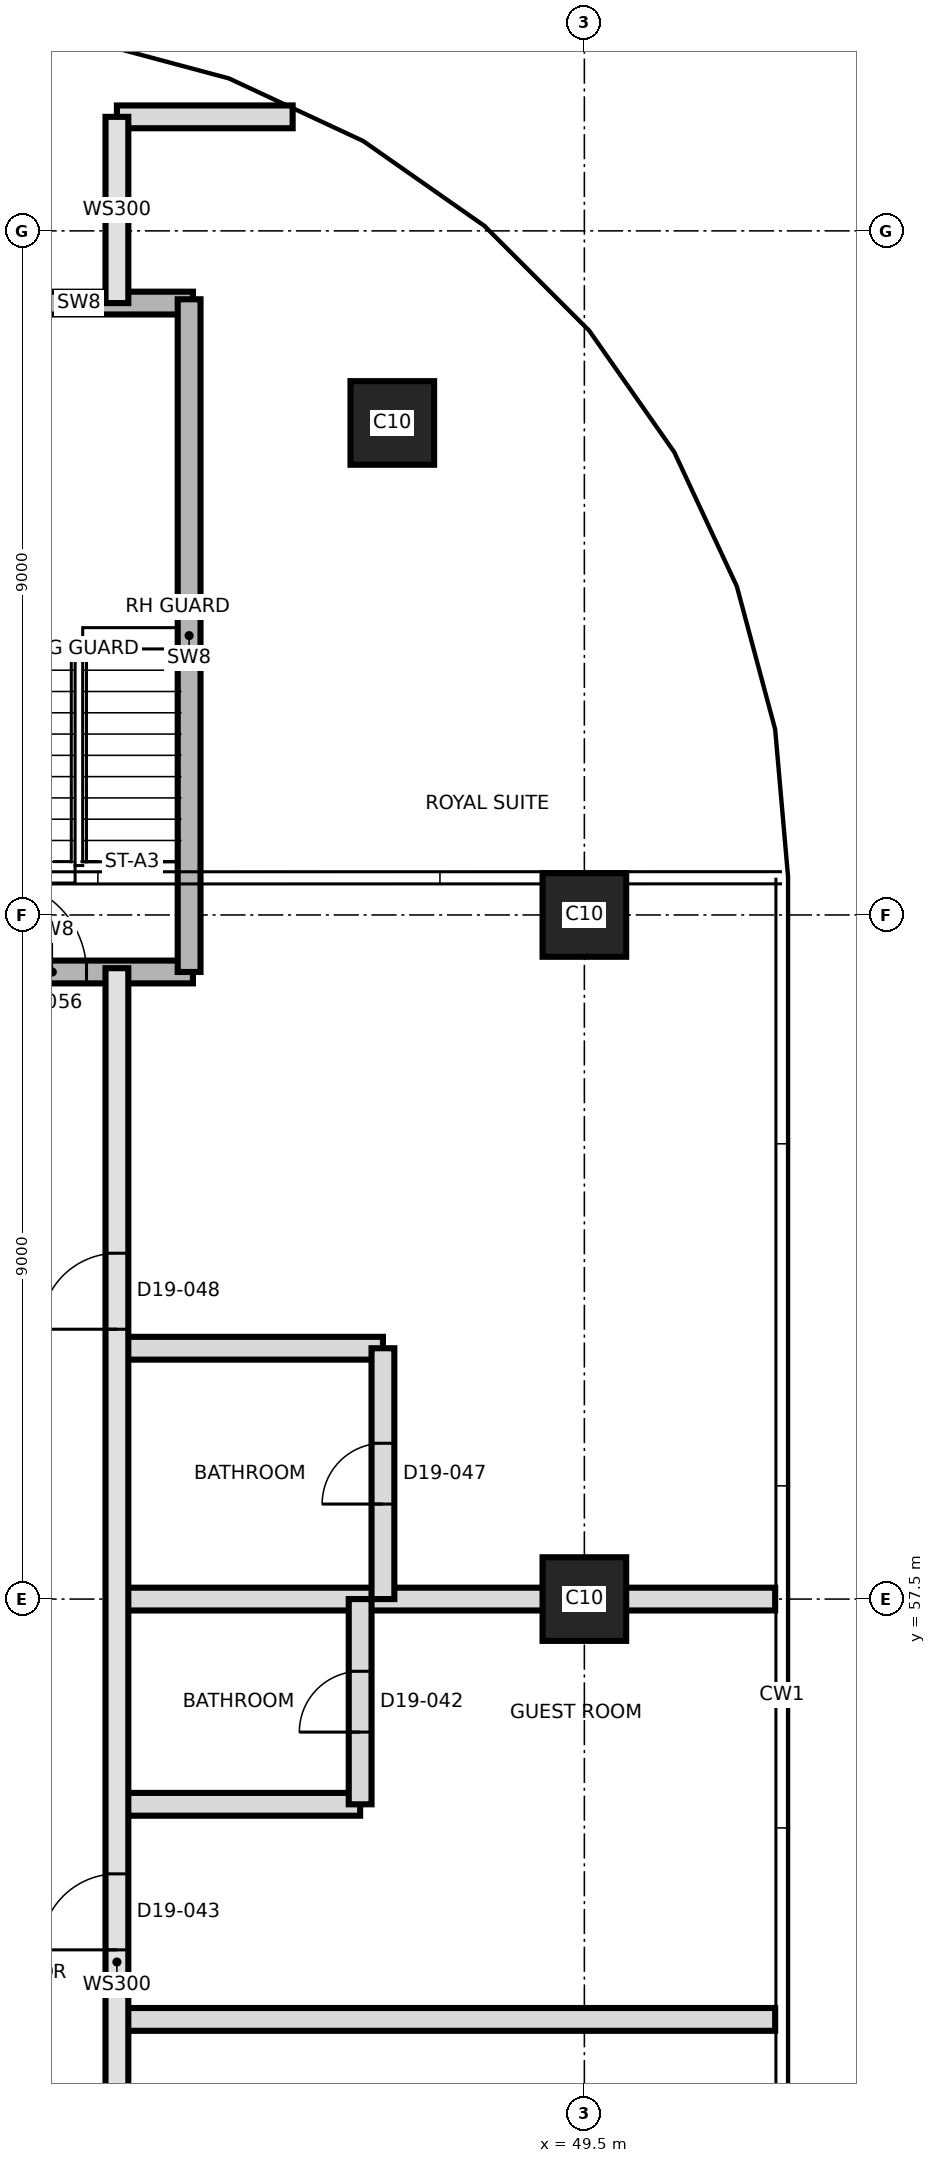
"""IFC4 building model, lengths in metres.
Left out: names, types, materials, properties, quantities, classifications, styles, units other than length and angle.
Written with IfcOpenShell. Run it as: python <this file> out.ifc"""

import sys

from ifc_helpers import new_model, si_unit, direction, frame, frame_2d, origin, origin_2d, place, context, subcontext, project, spatial, rectangle, extrude, element, fill, save


model = new_model("IFC4")
c1 = context("Model", 3, precision=1e-05, world=origin(), true_north=direction((0.0, 1.0)))
c2 = subcontext(c1, "Body", "Model", "MODEL_VIEW")
j1 = project(units=[si_unit("LENGTHUNIT", "METRE"), si_unit("PLANEANGLEUNIT", "RADIAN")], contexts=[c1])
p1 = place(None, origin())
s1 = spatial("IfcSite", under=j1, at=p1, CompositionType="ELEMENT")
p2 = place(p1, origin())
s2 = spatial("IfcBuilding", under=s1, at=p2, CompositionType="ELEMENT")
p3 = place(p2, frame((0.0, 0.0, 179.2)))
s3 = spatial("IfcBuildingStorey", under=s2, at=p3, CompositionType="ELEMENT", Elevation=179.2)
for number, where, z_axis, x_axis in (
    (1, (49.5, 57.5, 0.0), (0.0, 0.0, 1.0), (1.0, 0.0, 0.0)),
    (2, (49.5, 66.5, 0.0), (0.0, 0.0, 1.0), (1.0, 0.0, 0.0)),
    (3, (46.973, 72.973, 0.0), (0.0, 0.0, 1.0), (1.0, 0.0, 0.0)),
):
    element("IfcColumn", number, at=place(p3, frame(where, z_axis=z_axis, x_axis=x_axis)), inside=s3, PredefinedType="COLUMN", context=c2, shape_type="SweptSolid", body=[
        extrude(rectangle(XDim=1.1, YDim=1.1, at=origin_2d()), origin(), (0.0, 0.0, 1.0), 3.7),
    ])
p4 = place(p3, frame((43.35, 51.97, 0.0), z_axis=(0.0, 0.0, 1.0), x_axis=(1.0, 0.0, 0.0)))
e4 = element("IfcWall", 4, at=p4, inside=s3, PredefinedType="PARTITIONING", context=c2, shape_type="SweptSolid", body=[
    extrude(rectangle(XDim=8.66, YDim=0.3, at=frame_2d((4.33, 0.0))), origin(), (0.0, 0.0, 1.0), 3.4),
])
p5 = place(p3, frame((43.35, 54.8, 0.0), z_axis=(0.0, 0.0, 1.0), x_axis=(1.0, 0.0, 0.0)))
e5 = element("IfcWall", 5, at=p5, inside=s3, PredefinedType="PARTITIONING", context=c2, shape_type="SweptSolid", body=[
    extrude(rectangle(XDim=3.2, YDim=0.3, at=frame_2d((1.6, 0.0))), origin(), (0.0, 0.0, 1.0), 3.4),
])
p6 = place(p3, frame((43.35, 57.5, 0.0), z_axis=(0.0, 0.0, 1.0), x_axis=(1.0, 0.0, 0.0)))
e6 = element("IfcWall", 6, at=p6, inside=s3, PredefinedType="PARTITIONING", context=c2, shape_type="SweptSolid", body=[
    extrude(rectangle(XDim=8.66, YDim=0.3, at=frame_2d((4.33, 0.0))), origin(), (0.0, 0.0, 1.0), 3.4),
])
p7 = place(p3, frame((43.35, 60.8, 0.0), z_axis=(0.0, 0.0, 1.0), x_axis=(1.0, 0.0, 0.0)))
e7 = element("IfcWall", 7, at=p7, inside=s3, PredefinedType="PARTITIONING", context=c2, shape_type="SweptSolid", body=[
    extrude(rectangle(XDim=3.5, YDim=0.3, at=frame_2d((1.75, 0.0))), origin(), (0.0, 0.0, 1.0), 3.4),
])
p8 = place(p3, frame((40.65, 65.75, 0.0), z_axis=(0.0, 0.0, 1.0), x_axis=(1.0, 0.0, 0.0)))
e8 = element("IfcWall", 8, at=p8, inside=s3, PredefinedType="SHEAR", context=c2, shape_type="SweptSolid", body=[
    extrude(rectangle(XDim=3.7, YDim=0.3, at=frame_2d((1.85, 0.0))), origin(), (0.0, 0.0, 1.0), 3.4),
])
p9 = place(p8, frame((1.1, 0.0, 0.0)))
e9 = element("IfcOpeningElement", 9, at=p9, cuts=e8, PredefinedType="OPENING", context=c2, shape_type="SweptSolid", body=[
    extrude(rectangle(XDim=1.2, YDim=2.1, at=frame_2d((0.6, 1.05))), frame((0.0, 0.16, 0.0), z_axis=(0.0, -1.0, 0.0), x_axis=(1.0, 0.0, 0.0)), (0.0, 0.0, 1.0), 0.32),
])
p10 = place(p3, frame((41.35, 74.55, 0.0), z_axis=(0.0, 0.0, 1.0), x_axis=(1.0, 0.0, 0.0)))
e10 = element("IfcWall", 10, at=p10, inside=s3, PredefinedType="SHEAR", context=c2, shape_type="SweptSolid", body=[
    extrude(rectangle(XDim=3.0, YDim=0.3, at=frame_2d((1.5, 0.0))), origin(), (0.0, 0.0, 1.0), 3.4),
])
p11 = place(p3, frame((43.35, 77.0, 0.0), z_axis=(0.0, 0.0, 1.0), x_axis=(1.0, 0.0, 0.0)))
e11 = element("IfcWall", 11, at=p11, inside=s3, PredefinedType="PARTITIONING", context=c2, shape_type="SweptSolid", body=[
    extrude(rectangle(XDim=2.312, YDim=0.3, at=frame_2d((1.156, 0.0))), origin(), (0.0, 0.0, 1.0), 3.4),
])
p12 = place(p3, frame((43.35, 39.65, 0.0), z_axis=(0.0, 0.0, 1.0), x_axis=(0.0, 1.0, 0.0)))
e12 = element("IfcWall", 12, at=p12, inside=s3, PredefinedType="SOLIDWALL", context=c2, shape_type="SweptSolid", body=[
    extrude(rectangle(XDim=26.15, YDim=0.3, at=frame_2d((13.075, 0.0))), origin(), (0.0, 0.0, 1.0), 3.4),
])
p13 = place(p12, frame((3.265, 0.0, 0.0)))
e13 = element("IfcOpeningElement", 13, at=p13, cuts=e12, PredefinedType="OPENING", context=c2, shape_type="SweptSolid", body=[
    extrude(rectangle(XDim=1.0, YDim=2.1, at=frame_2d((0.5, 1.05))), frame((0.0, 0.16, 0.0), z_axis=(0.0, -1.0, 0.0), x_axis=(1.0, 0.0, 0.0)), (0.0, 0.0, 1.0), 0.32),
])
p14 = place(p12, frame((6.215, 0.0, 0.0)))
e14 = element("IfcOpeningElement", 14, at=p14, cuts=e12, PredefinedType="OPENING", context=c2, shape_type="SweptSolid", body=[
    extrude(rectangle(XDim=1.4, YDim=2.1, at=frame_2d((0.7, 1.05))), frame((0.0, 0.16, 0.0), z_axis=(0.0, -1.0, 0.0), x_axis=(1.0, 0.0, 0.0)), (0.0, 0.0, 1.0), 0.32),
])
p15 = place(p12, frame((9.985, 0.0, 0.0)))
e15 = element("IfcOpeningElement", 15, at=p15, cuts=e12, PredefinedType="OPENING", context=c2, shape_type="SweptSolid", body=[
    extrude(rectangle(XDim=1.2, YDim=2.1, at=frame_2d((0.6, 1.05))), frame((0.0, 0.16, 0.0), z_axis=(0.0, -1.0, 0.0), x_axis=(1.0, 0.0, 0.0)), (0.0, 0.0, 1.0), 0.32),
])
p16 = place(p12, frame((13.235, 0.0, 0.0)))
e16 = element("IfcOpeningElement", 16, at=p16, cuts=e12, PredefinedType="OPENING", context=c2, shape_type="SweptSolid", body=[
    extrude(rectangle(XDim=1.0, YDim=2.1, at=frame_2d((0.5, 1.05))), frame((0.0, 0.16, 0.0), z_axis=(0.0, -1.0, 0.0), x_axis=(1.0, 0.0, 0.0)), (0.0, 0.0, 1.0), 0.32),
])
p17 = place(p12, frame((21.4, 0.0, 0.0)))
e17 = element("IfcOpeningElement", 17, at=p17, cuts=e12, PredefinedType="OPENING", context=c2, shape_type="SweptSolid", body=[
    extrude(rectangle(XDim=1.0, YDim=2.4, at=frame_2d((0.5, 1.2))), frame((0.0, 0.16, 0.0), z_axis=(0.0, -1.0, 0.0), x_axis=(1.0, 0.0, 0.0)), (0.0, 0.0, 1.0), 0.32),
])
p18 = place(p3, frame((43.35, 74.55, 0.0), z_axis=(0.0, 0.0, 1.0), x_axis=(0.0, 1.0, 0.0)))
e18 = element("IfcWall", 18, at=p18, inside=s3, PredefinedType="SOLIDWALL", context=c2, shape_type="SweptSolid", body=[
    extrude(rectangle(XDim=2.45, YDim=0.3, at=frame_2d((1.225, 0.0))), origin(), (0.0, 0.0, 1.0), 3.4),
])
p19 = place(p3, frame((44.3, 65.75, 0.0), z_axis=(0.0, 0.0, 1.0), x_axis=(0.0, 1.0, 0.0)))
e19 = element("IfcWall", 19, at=p19, inside=s3, PredefinedType="SHEAR", context=c2, shape_type="SweptSolid", body=[
    extrude(rectangle(XDim=8.85, YDim=0.3, at=frame_2d((4.425, 0.0))), origin(), (0.0, 0.0, 1.0), 3.4),
])
p20 = place(p3, frame((46.55, 54.8, 0.0), z_axis=(0.0, 0.0, 1.0), x_axis=(0.0, 1.0, 0.0)))
e20 = element("IfcWall", 20, at=p20, inside=s3, PredefinedType="PARTITIONING", context=c2, shape_type="SweptSolid", body=[
    extrude(rectangle(XDim=2.7, YDim=0.3, at=frame_2d((1.35, 0.0))), origin(), (0.0, 0.0, 1.0), 3.4),
])
p21 = place(p20, frame((0.95, 0.0, 0.0)))
e21 = element("IfcOpeningElement", 21, at=p21, cuts=e20, PredefinedType="OPENING", context=c2, shape_type="SweptSolid", body=[
    extrude(rectangle(XDim=0.8, YDim=2.1, at=frame_2d((0.4, 1.05))), frame((0.0, 0.16, 0.0), z_axis=(0.0, -1.0, 0.0), x_axis=(1.0, 0.0, 0.0)), (0.0, 0.0, 1.0), 0.32),
])
p22 = place(p3, frame((46.85, 57.5, 0.0), z_axis=(0.0, 0.0, 1.0), x_axis=(0.0, 1.0, 0.0)))
e22 = element("IfcWall", 22, at=p22, inside=s3, PredefinedType="PARTITIONING", context=c2, shape_type="SweptSolid", body=[
    extrude(rectangle(XDim=3.3, YDim=0.3, at=frame_2d((1.65, 0.0))), origin(), (0.0, 0.0, 1.0), 3.4),
])
p23 = place(p22, frame((1.25, 0.0, 0.0)))
e23 = element("IfcOpeningElement", 23, at=p23, cuts=e22, PredefinedType="OPENING", context=c2, shape_type="SweptSolid", body=[
    extrude(rectangle(XDim=0.8, YDim=2.1, at=frame_2d((0.4, 1.05))), frame((0.0, 0.16, 0.0), z_axis=(0.0, -1.0, 0.0), x_axis=(1.0, 0.0, 0.0)), (0.0, 0.0, 1.0), 0.32),
])
p24 = place(p21, origin())
e24 = element("IfcDoor", 24, at=p24, inside=s3, OperationType="SINGLE_SWING_LEFT", PredefinedType="DOOR", context=c2, shape_type="SweptSolid", body=[
    extrude(rectangle(XDim=0.8, YDim=2.1, at=frame_2d((0.4, 1.05))), frame((0.0, 0.025, 0.0), z_axis=(0.0, -1.0, 0.0), x_axis=(1.0, 0.0, 0.0)), (0.0, 0.0, 1.0), 0.05),
])
fill(e21, e24)
p25 = place(p16, origin())
e25 = element("IfcDoor", 25, at=p25, inside=s3, OperationType="SINGLE_SWING_LEFT", PredefinedType="DOOR", context=c2, shape_type="SweptSolid", body=[
    extrude(rectangle(XDim=1.0, YDim=2.1, at=frame_2d((0.5, 1.05))), frame((0.0, 0.025, 0.0), z_axis=(0.0, -1.0, 0.0), x_axis=(1.0, 0.0, 0.0)), (0.0, 0.0, 1.0), 0.05),
])
fill(e16, e25)
p26 = place(p23, origin())
e26 = element("IfcDoor", 26, at=p26, inside=s3, OperationType="SINGLE_SWING_LEFT", PredefinedType="DOOR", context=c2, shape_type="SweptSolid", body=[
    extrude(rectangle(XDim=0.8, YDim=2.1, at=frame_2d((0.4, 1.05))), frame((0.0, 0.025, 0.0), z_axis=(0.0, -1.0, 0.0), x_axis=(1.0, 0.0, 0.0)), (0.0, 0.0, 1.0), 0.05),
])
fill(e23, e26)
p27 = place(p17, origin())
e27 = element("IfcDoor", 27, at=p27, inside=s3, OperationType="SINGLE_SWING_RIGHT", PredefinedType="DOOR", context=c2, shape_type="SweptSolid", body=[
    extrude(rectangle(XDim=1.0, YDim=2.4, at=frame_2d((0.5, 1.2))), frame((0.0, 0.025, 0.0), z_axis=(0.0, -1.0, 0.0), x_axis=(1.0, 0.0, 0.0)), (0.0, 0.0, 1.0), 0.05),
])
fill(e17, e27)
p28 = place(p9, origin())
e28 = element("IfcDoor", 28, at=p28, inside=s3, OperationType="SINGLE_SWING_RIGHT", PredefinedType="DOOR", context=c2, shape_type="SweptSolid", body=[
    extrude(rectangle(XDim=1.2, YDim=2.1, at=frame_2d((0.6, 1.05))), frame((0.0, 0.025, 0.0), z_axis=(0.0, -1.0, 0.0), x_axis=(1.0, 0.0, 0.0)), (0.0, 0.0, 1.0), 0.05),
])
fill(e9, e28)
save(model, sys.argv[1])
